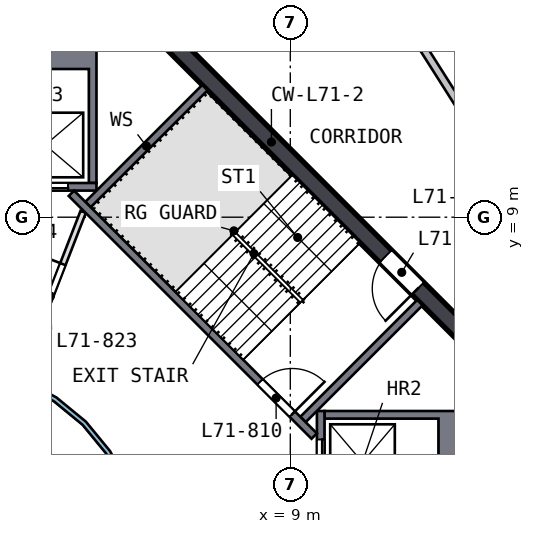
"""IFC4 building model, lengths in metres.
Left out: names, types, materials, properties, quantities, classifications, styles, units other than length and angle.
Written with IfcOpenShell. Run it as: python <this file> out.ifc"""

import sys

from ifc_helpers import new_model, si_unit, direction, frame, frame_2d, origin, place, context, subcontext, project, spatial, polyline, rectangle, outline, extrude, element, fill, save


model = new_model("IFC4")
c1 = context("Model", 3, precision=1e-05, world=origin(), true_north=direction((0.0, 1.0)))
c2 = subcontext(c1, "Body", "Model", "MODEL_VIEW")
j1 = project(units=[si_unit("LENGTHUNIT", "METRE"), si_unit("PLANEANGLEUNIT", "RADIAN")], contexts=[c1])
p1 = place(None, origin())
s1 = spatial("IfcSite", under=j1, at=p1, CompositionType="ELEMENT")
p2 = place(p1, origin())
s2 = spatial("IfcBuilding", under=s1, at=p2, CompositionType="ELEMENT")
p3 = place(p2, frame((0.0, 0.0, 288.0)))
s3 = spatial("IfcBuildingStorey", under=s2, at=p3, CompositionType="ELEMENT", Elevation=288.0)
p4 = place(p3, frame((13.841, 5.64, 0.0), z_axis=(0.0, 0.0, 1.0), x_axis=(-0.707106781, 0.707106781, 0.0)))
e1 = element("IfcWall", 1, at=p4, inside=s3, PredefinedType="SHEAR", context=c2, shape_type="SweptSolid", body=[
    extrude(rectangle(XDim=11.598, YDim=0.45, at=frame_2d((5.799, 0.0))), origin(), (0.0, 0.0, 1.0), 3.5),
])
p5 = place(p4, frame((2.099, 0.0, 0.0)))
e2 = element("IfcOpeningElement", 2, at=p5, cuts=e1, PredefinedType="OPENING", context=c2, shape_type="SweptSolid", body=[
    extrude(rectangle(XDim=1.2, YDim=2.1, at=frame_2d((0.6, 1.05))), frame((0.0, 0.235, 0.0), z_axis=(0.0, -1.0, 0.0), x_axis=(1.0, 0.0, 0.0)), (0.0, 0.0, 1.0), 0.47),
])
p6 = place(p3, origin())
e3 = element("IfcWall", 3, at=p6, inside=s3, PredefinedType="SOLIDWALL", context=c2, shape_type="SweptSolid", body=[
    extrude(outline(polyline([(13.55, 3.9), (13.55, 1.2), (9.9, 1.2), (9.9, 1.4), (12.9, 1.4), (12.9, 3.7), (9.9, 3.7), (9.9, 3.9), (13.55, 3.9)])), origin(), (0.0, 0.0, 1.0), 3.19),
])
p7 = place(p3, frame((9.8, 1.2, 0.0), z_axis=(0.0, 0.0, 1.0), x_axis=(0.0, 1.0, 0.0)))
e4 = element("IfcWall", 4, at=p7, inside=s3, PredefinedType="SOLIDWALL", context=c2, shape_type="SweptSolid", body=[
    extrude(rectangle(XDim=2.7, YDim=0.2, at=frame_2d((1.35, 0.0))), origin(), (0.0, 0.0, 1.0), 3.19),
])
p8 = place(p7, frame((0.75, 0.0, 0.0)))
e5 = element("IfcOpeningElement", 5, at=p8, cuts=e4, PredefinedType="OPENING", context=c2, shape_type="SweptSolid", body=[
    extrude(rectangle(XDim=1.2, YDim=2.1, at=frame_2d((0.6, 1.05))), frame((0.0, 0.11, 0.0), z_axis=(0.0, -1.0, 0.0), x_axis=(1.0, 0.0, 0.0)), (0.0, 0.0, 1.0), 0.22),
])
p9 = place(p3, origin())
e6 = element("IfcWall", 6, at=p9, inside=s3, PredefinedType="SOLIDWALL", context=c2, shape_type="SweptSolid", body=[
    extrude(outline(polyline([(3.9, 9.9), (3.7, 9.9), (3.7, 12.9), (1.4, 12.9), (1.4, 9.9), (1.2, 9.9), (1.2, 13.55), (3.9, 13.55), (3.9, 9.9)])), origin(), (0.0, 0.0, 1.0), 3.19),
])
p10 = place(p3, frame((1.2, 9.8, 0.0), z_axis=(0.0, 0.0, 1.0), x_axis=(1.0, 0.0, 0.0)))
e7 = element("IfcWall", 7, at=p10, inside=s3, PredefinedType="SOLIDWALL", context=c2, shape_type="SweptSolid", body=[
    extrude(rectangle(XDim=2.7, YDim=0.2, at=frame_2d((1.35, 0.0))), origin(), (0.0, 0.0, 1.0), 3.19),
])
p11 = place(p10, frame((0.75, 0.0, 0.0)))
e8 = element("IfcOpeningElement", 8, at=p11, cuts=e7, PredefinedType="OPENING", context=c2, shape_type="SweptSolid", body=[
    extrude(rectangle(XDim=1.2, YDim=2.1, at=frame_2d((0.6, 1.05))), frame((0.0, 0.11, 0.0), z_axis=(0.0, -1.0, 0.0), x_axis=(1.0, 0.0, 0.0)), (0.0, 0.0, 1.0), 0.22),
])
p12 = place(p3, frame((3.24, 9.629, 0.0), z_axis=(0.0, 0.0, 1.0), x_axis=(0.707106781, -0.707106781, 0.0)))
e9 = element("IfcWall", 9, at=p12, inside=s3, PredefinedType="SOLIDWALL", context=c2, shape_type="SweptSolid", body=[
    extrude(rectangle(XDim=9.036, YDim=0.2, at=frame_2d((4.518, 0.0))), origin(), (0.0, 0.0, 1.0), 3.19),
])
p13 = place(p12, frame((7.018, 0.0, 0.0)))
e10 = element("IfcOpeningElement", 10, at=p13, cuts=e9, PredefinedType="OPENING", context=c2, shape_type="SweptSolid", body=[
    extrude(rectangle(XDim=1.2, YDim=2.1, at=frame_2d((0.6, 1.05))), frame((0.0, 0.11, 0.0), z_axis=(0.0, -1.0, 0.0), x_axis=(1.0, 0.0, 0.0)), (0.0, 0.0, 1.0), 0.22),
])
for number, where, z_axis, x_axis in (
    (11, (9.334, 3.677, 0.0), (0.0, 0.0, 1.0), (0.707, 0.707, 0.0)),
    (12, (3.677, 9.334, 0.0), (0.0, 0.0, 1.0), (0.707, 0.707, 0.0)),
):
    element("IfcWall", number, at=place(p3, frame(where, z_axis=z_axis, x_axis=x_axis)), inside=s3, PredefinedType="SOLIDWALL", context=c2, shape_type="SweptSolid", body=[
        extrude(rectangle(XDim=4.35, YDim=0.2, at=frame_2d((2.175, 0.0))), origin(), (0.0, 0.0, 1.0), 3.19),
    ])
p14 = place(p3, frame((1.857, 4.782, 0.0), z_axis=(0.0, 0.0, 1.0), x_axis=(0.36202798, 0.932167228, 0.0)))
e13 = element("IfcWall", 13, at=p14, inside=s3, PredefinedType="PARTITIONING", context=c2, shape_type="SweptSolid", body=[
    extrude(rectangle(XDim=4.676, YDim=0.15, at=frame_2d((2.338, 0.0))), origin(), (0.0, 0.0, 1.0), 3.19),
])
p15 = place(p14, frame((1.4, 0.0, 0.0)))
e14 = element("IfcOpeningElement", 14, at=p15, cuts=e13, PredefinedType="OPENING", context=c2, shape_type="SweptSolid", body=[
    extrude(rectangle(XDim=1.8, YDim=2.1, at=frame_2d((0.9, 1.05))), frame((0.0, 0.085, 0.0), z_axis=(0.0, -1.0, 0.0), x_axis=(1.0, 0.0, 0.0)), (0.0, 0.0, 1.0), 0.17),
])
p16 = place(p3, origin())
e15 = element("IfcWall", 15, at=p16, inside=s3, PredefinedType="SOLIDWALL", context=c2, shape_type="SweptSolid", body=[
    extrude(outline(polyline([(5.021, -0.999), (4.73, -1.959), (4.257, -2.844), (3.62, -3.62), (2.844, -4.257), (1.959, -4.73), (0.999, -5.021), (0.0, -5.12), (-0.999, -5.021), (-1.959, -4.73), (-2.844, -4.257), (-3.62, -3.62), (-4.257, -2.844), (-4.73, -1.959), (-5.021, -0.999), (-5.12, 0.0), (-5.021, 0.999), (-4.73, 1.959), (-4.257, 2.844), (-3.62, 3.62), (-2.844, 4.257), (-1.959, 4.73), (-0.999, 5.021), (0.0, 5.12), (0.999, 5.021), (1.959, 4.73), (2.844, 4.257), (3.62, 3.62), (4.257, 2.844), (4.73, 1.959), (5.021, 0.999), (5.12, 0.0), (5.021, -0.999)]), holes=[polyline([(4.904, 0.976), (4.619, 1.913), (4.157, 2.778), (3.535, 3.535), (2.778, 4.157), (1.913, 4.619), (0.976, 4.904), (0.0, 5.0), (-0.976, 4.904), (-1.913, 4.619), (-2.778, 4.157), (-3.535, 3.535), (-4.157, 2.778), (-4.619, 1.913), (-4.904, 0.976), (-5.0, 0.0), (-4.904, -0.976), (-4.619, -1.913), (-4.157, -2.778), (-3.535, -3.535), (-2.778, -4.157), (-1.913, -4.619), (-0.976, -4.904), (0.0, -5.0), (0.976, -4.904), (1.913, -4.619), (2.778, -4.157), (3.535, -3.535), (4.157, -2.778), (4.619, -1.913), (4.904, -0.976), (5.0, 0.0), (4.904, 0.976)])]), origin(), (0.0, 0.0, 1.0), 3.19),
])
p17 = place(p3, frame((12.444, 13.533, 0.0), z_axis=(0.0, 0.0, 1.0), x_axis=(0.535837373, -0.844321212, 0.0)))
e16 = element("IfcWall", 16, at=p17, inside=s3, PredefinedType="SOLIDWALL", context=c2, shape_type="SweptSolid", body=[
    extrude(rectangle(XDim=9.317, YDim=0.2, at=frame_2d((4.658, 0.0))), origin(), (0.0, 0.0, 1.0), 3.19),
])
p18 = place(p17, frame((3.864, 0.0, 0.0)))
e17 = element("IfcOpeningElement", 17, at=p18, cuts=e16, PredefinedType="OPENING", context=c2, shape_type="SweptSolid", body=[
    extrude(rectangle(XDim=1.8, YDim=2.1, at=frame_2d((0.9, 1.05))), frame((0.0, 0.11, 0.0), z_axis=(0.0, -1.0, 0.0), x_axis=(1.0, 0.0, 0.0)), (0.0, 0.0, 1.0), 0.22),
])
p19 = place(p8, origin())
e18 = element("IfcDoor", 18, at=p19, inside=s3, OperationType="DOUBLE_DOOR_SLIDING", PredefinedType="DOOR", context=c2, shape_type="SweptSolid", body=[
    extrude(rectangle(XDim=1.2, YDim=2.1, at=frame_2d((0.6, 1.05))), frame((0.0, 0.025, 0.0), z_axis=(0.0, -1.0, 0.0), x_axis=(1.0, 0.0, 0.0)), (0.0, 0.0, 1.0), 0.05),
])
fill(e5, e18)
p20 = place(p11, origin())
e19 = element("IfcDoor", 19, at=p20, inside=s3, OperationType="DOUBLE_DOOR_SLIDING", PredefinedType="DOOR", context=c2, shape_type="SweptSolid", body=[
    extrude(rectangle(XDim=1.2, YDim=2.1, at=frame_2d((0.6, 1.05))), frame((0.0, 0.025, 0.0), z_axis=(0.0, -1.0, 0.0), x_axis=(1.0, 0.0, 0.0)), (0.0, 0.0, 1.0), 0.05),
])
fill(e8, e19)
p21 = place(p13, origin())
e20 = element("IfcDoor", 20, at=p21, inside=s3, OperationType="SINGLE_SWING_RIGHT", PredefinedType="DOOR", context=c2, shape_type="SweptSolid", body=[
    extrude(rectangle(XDim=1.2, YDim=2.1, at=frame_2d((0.6, 1.05))), frame((0.0, 0.025, 0.0), z_axis=(0.0, -1.0, 0.0), x_axis=(1.0, 0.0, 0.0)), (0.0, 0.0, 1.0), 0.05),
])
fill(e10, e20)
p22 = place(p5, origin())
e21 = element("IfcDoor", 21, at=p22, inside=s3, OperationType="SINGLE_SWING_LEFT", PredefinedType="DOOR", context=c2, shape_type="SweptSolid", body=[
    extrude(rectangle(XDim=1.2, YDim=2.1, at=frame_2d((0.6, 1.05))), frame((0.0, 0.025, 0.0), z_axis=(0.0, -1.0, 0.0), x_axis=(1.0, 0.0, 0.0)), (0.0, 0.0, 1.0), 0.05),
])
fill(e2, e21)
p23 = place(p15, origin())
e22 = element("IfcDoor", 22, at=p23, inside=s3, OperationType="DOUBLE_DOOR_SINGLE_SWING", PredefinedType="DOOR", context=c2, shape_type="SweptSolid", body=[
    extrude(rectangle(XDim=1.8, YDim=2.1, at=frame_2d((0.9, 1.05))), frame((0.0, 0.025, 0.0), z_axis=(0.0, -1.0, 0.0), x_axis=(1.0, 0.0, 0.0)), (0.0, 0.0, 1.0), 0.05),
])
fill(e14, e22)
save(model, sys.argv[1])
